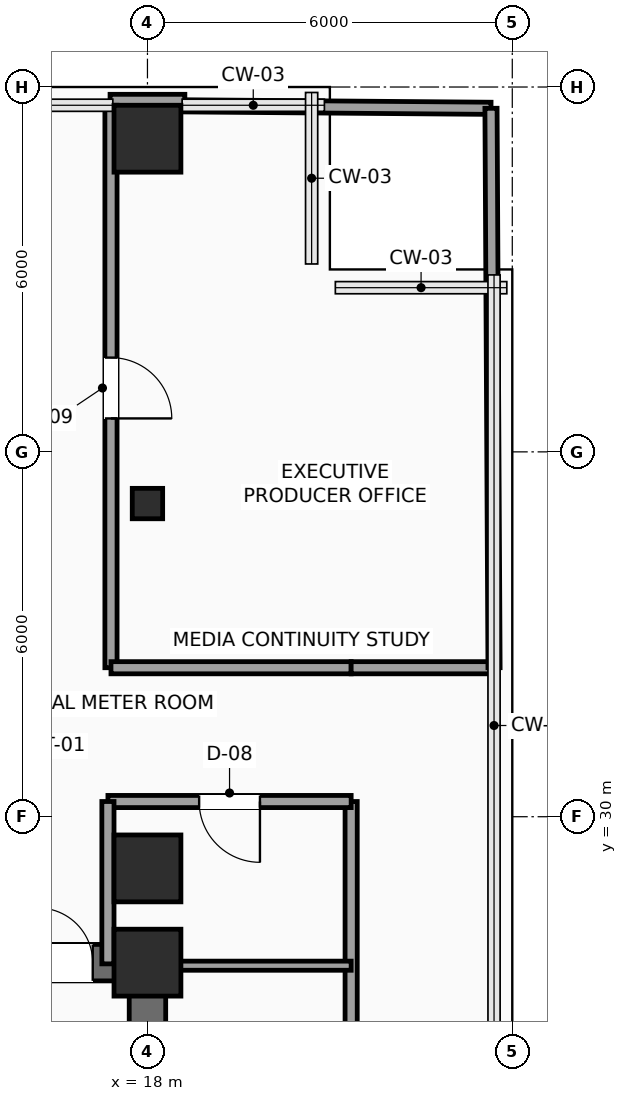
"""IFC4 building model, lengths in metres.
Left out: names, types, materials, properties, quantities, classifications, styles, units other than length and angle.
Written with IfcOpenShell. Run it as: python <this file> out.ifc"""

import sys

from ifc_helpers import new_model, si_unit, direction, frame, frame_2d, origin, origin_2d, place, context, subcontext, project, spatial, rectangle, hollow_rectangle, extrude, element, fill, save


model = new_model("IFC4")
c1 = context("Model", 3, precision=1e-05, world=origin(), true_north=direction((0.0, 1.0)))
c2 = subcontext(c1, "Body", "Model", "MODEL_VIEW")
j1 = project(units=[si_unit("LENGTHUNIT", "METRE"), si_unit("PLANEANGLEUNIT", "RADIAN")], contexts=[c1])
p1 = place(None, origin())
s1 = spatial("IfcSite", under=j1, at=p1, CompositionType="ELEMENT")
p2 = place(p1, origin())
s2 = spatial("IfcBuilding", under=s1, at=p2, CompositionType="ELEMENT")
p3 = place(p2, frame((0.0, 0.0, 123.15)))
s3 = spatial("IfcBuildingStorey", under=s2, at=p3, CompositionType="ELEMENT", Elevation=123.15)
for number, where, z_axis, x_axis in (
    (1, (18.0, 27.6, 0.0), (0.0, 0.0, 1.0), (1.0, 0.0, 0.0)),
    (2, (18.0, 29.15, 0.0), (0.0, 0.0, 1.0), (1.0, 0.0, 0.0)),
):
    element("IfcColumn", number, at=place(p3, frame(where, z_axis=z_axis, x_axis=x_axis)), inside=s3, PredefinedType="COLUMN", context=c2, shape_type="SweptSolid", body=[
        extrude(rectangle(XDim=1.1, YDim=1.1, at=origin_2d()), origin(), (0.0, 0.0, 1.0), 3.75),
    ])
p4 = place(p3, frame((18.0, 35.15, 0.0), z_axis=(0.0, 0.0, 1.0), x_axis=(1.0, 0.0, 0.0)))
e3 = element("IfcColumn", 3, at=p4, inside=s3, PredefinedType="COLUMN", context=c2, shape_type="SweptSolid", body=[
    extrude(hollow_rectangle(XDim=0.5, YDim=0.5, WallThickness=0.025, InnerFilletRadius=0.025, OuterFilletRadius=0.04, at=origin_2d()), origin(), (0.0, 0.0, 1.0), 3.75),
])
p5 = place(p3, frame((18.0, 41.15, 0.0), z_axis=(0.0, 0.0, 1.0), x_axis=(1.0, 0.0, 0.0)))
e4 = element("IfcColumn", 4, at=p5, inside=s3, PredefinedType="COLUMN", context=c2, shape_type="SweptSolid", body=[
    extrude(rectangle(XDim=1.1, YDim=1.1, at=origin_2d()), origin(), (0.0, 0.0, 1.0), 3.75),
])
p6 = place(p3, frame((17.385, 41.76, 0.0), z_axis=(0.0, 0.0, 1.0), x_axis=(1.0, 0.0, 0.0)))
e5 = element("IfcWall", 5, at=p6, inside=s3, PredefinedType="SOLIDWALL", context=c2, shape_type="SweptSolid", body=[
    extrude(rectangle(XDim=1.23, YDim=0.24, at=frame_2d((0.615, 0.0))), origin(), (0.0, 0.0, 1.0), 3.525),
])
p7 = place(p3, frame((6.0, 27.6, 0.0), z_axis=(0.0, 0.0, 1.0), x_axis=(1.0, 0.0, 0.0)))
e6 = element("IfcWall", 6, at=p7, inside=s3, PredefinedType="SHEAR", context=c2, shape_type="SweptSolid", body=[
    extrude(rectangle(XDim=12.0, YDim=0.6, at=frame_2d((6.0, 0.0))), origin(), (0.0, 0.0, 1.0), 3.525),
])
p8 = place(p7, frame((10.2, 0.0, 0.0)))
e7 = element("IfcOpeningElement", 7, at=p8, cuts=e6, PredefinedType="OPENING", context=c2, shape_type="SweptSolid", body=[
    extrude(rectangle(XDim=0.9, YDim=2.15, at=frame_2d((0.45, 1.075))), frame((0.0, 0.31, 0.0), z_axis=(0.0, -1.0, 0.0), x_axis=(1.0, 0.0, 0.0)), (0.0, 0.0, 1.0), 0.62),
])
p9 = place(p3, frame((18.0, 18.0, 0.0), z_axis=(0.0, 0.0, 1.0), x_axis=(0.0, 1.0, 0.0)))
e8 = element("IfcWall", 8, at=p9, inside=s3, PredefinedType="SHEAR", context=c2, shape_type="SweptSolid", body=[
    extrude(rectangle(XDim=9.6, YDim=0.6, at=frame_2d((4.8, 0.0))), origin(), (0.0, 0.0, 1.0), 3.525),
])
p10 = place(p3, frame((21.35, 11.25, 0.0), z_axis=(0.0, 0.0, 1.0), x_axis=(0.0, 1.0, 0.0)))
e9 = element("IfcWall", 9, at=p10, inside=s3, PredefinedType="SOLIDWALL", context=c2, shape_type="SweptSolid", body=[
    extrude(rectangle(XDim=19.0, YDim=0.2, at=frame_2d((9.5, 0.0))), origin(), (0.0, 0.0, 1.0), 3.525),
])
p11 = place(p10, frame((8.7, 0.0, 0.0)))
e10 = element("IfcOpeningElement", 10, at=p11, cuts=e9, PredefinedType="OPENING", context=c2, shape_type="SweptSolid", body=[
    extrude(rectangle(XDim=0.95, YDim=2.15, at=frame_2d((0.475, 1.075))), frame((0.0, 0.11, 0.0), z_axis=(0.0, -1.0, 0.0), x_axis=(1.0, 0.0, 0.0)), (0.0, 0.0, 1.0), 0.22),
])
p12 = place(p10, frame((13.475, 0.0, 0.0)))
e11 = element("IfcOpeningElement", 11, at=p12, cuts=e9, PredefinedType="OPENING", context=c2, shape_type="SweptSolid", body=[
    extrude(rectangle(XDim=0.9, YDim=2.1, at=frame_2d((0.45, 1.05))), frame((0.0, 0.11, 0.0), z_axis=(0.0, -1.0, 0.0), x_axis=(1.0, 0.0, 0.0)), (0.0, 0.0, 1.0), 0.22),
])
p13 = place(p10, frame((5.0, 0.0, 0.0)))
e12 = element("IfcOpeningElement", 12, at=p13, cuts=e9, PredefinedType="OPENING", context=c2, shape_type="SweptSolid", body=[
    extrude(rectangle(XDim=1.0, YDim=2.2, at=frame_2d((0.5, 1.1))), frame((0.0, 0.11, 0.0), z_axis=(0.0, -1.0, 0.0), x_axis=(1.0, 0.0, 0.0)), (0.0, 0.0, 1.0), 0.22),
])
p14 = place(p3, frame((21.35, 30.25, 0.0), z_axis=(0.0, 0.0, 1.0), x_axis=(-1.0, 0.0, 0.0)))
e13 = element("IfcWall", 13, at=p14, inside=s3, PredefinedType="SOLIDWALL", context=c2, shape_type="SweptSolid", body=[
    extrude(rectangle(XDim=4.0, YDim=0.2, at=frame_2d((2.0, 0.0))), origin(), (0.0, 0.0, 1.0), 3.525),
])
p15 = place(p14, frame((1.5, 0.0, 0.0)))
e14 = element("IfcOpeningElement", 14, at=p15, cuts=e13, PredefinedType="OPENING", context=c2, shape_type="SweptSolid", body=[
    extrude(rectangle(XDim=1.0, YDim=2.2, at=frame_2d((0.5, 1.1))), frame((0.0, 0.11, 0.0), z_axis=(0.0, -1.0, 0.0), x_axis=(1.0, 0.0, 0.0)), (0.0, 0.0, 1.0), 0.22),
])
p16 = place(p3, frame((17.35, 30.25, 0.0), z_axis=(0.0, 0.0, 1.0), x_axis=(0.0, -1.0, 0.0)))
e15 = element("IfcWall", 15, at=p16, inside=s3, PredefinedType="SOLIDWALL", context=c2, shape_type="SweptSolid", body=[
    extrude(rectangle(XDim=2.67, YDim=0.2, at=frame_2d((1.335, 0.0))), origin(), (0.0, 0.0, 1.0), 3.525),
])
p17 = place(p3, frame((17.4, 41.7, 0.0), z_axis=(0.0, 0.0, 1.0), x_axis=(0.0, -1.0, 0.0)))
e16 = element("IfcWall", 16, at=p17, inside=s3, PredefinedType="SOLIDWALL", context=c2, shape_type="SweptSolid", body=[
    extrude(rectangle(XDim=9.25, YDim=0.2, at=frame_2d((4.625, 0.0))), origin(), (0.0, 0.0, 1.0), 3.525),
])
p18 = place(p17, frame((4.15, 0.0, 0.0)))
e17 = element("IfcOpeningElement", 17, at=p18, cuts=e16, PredefinedType="OPENING", context=c2, shape_type="SweptSolid", body=[
    extrude(rectangle(XDim=1.0, YDim=2.2, at=frame_2d((0.5, 1.1))), frame((0.0, 0.11, 0.0), z_axis=(0.0, -1.0, 0.0), x_axis=(1.0, 0.0, 0.0)), (0.0, 0.0, 1.0), 0.22),
])
p19 = place(p3, frame((17.4, 32.45, 0.0), z_axis=(0.0, 0.0, 1.0), x_axis=(1.0, 0.0, 0.0)))
e18 = element("IfcWall", 18, at=p19, inside=s3, PredefinedType="SOLIDWALL", context=c2, shape_type="SweptSolid", body=[
    extrude(rectangle(XDim=3.95, YDim=0.2, at=frame_2d((1.975, 0.0))), origin(), (0.0, 0.0, 1.0), 3.525),
])
p20 = place(p3, frame((21.35, 32.45, 0.0), z_axis=(0.0, 0.0, 1.0), x_axis=(1.0, 0.0, 0.0)))
e19 = element("IfcWall", 19, at=p20, inside=s3, PredefinedType="SOLIDWALL", context=c2, shape_type="SweptSolid", body=[
    extrude(rectangle(XDim=2.35, YDim=0.2, at=frame_2d((1.175, 0.0))), origin(), (0.0, 0.0, 1.0), 3.525),
])
p21 = place(p3, frame((18.1, 27.55, 0.0), z_axis=(0.0, 0.0, 1.0), x_axis=(1.0, 0.0, 0.0)))
e20 = element("IfcWall", 20, at=p21, inside=s3, PredefinedType="PARTITIONING", context=c2, shape_type="SweptSolid", body=[
    extrude(rectangle(XDim=3.25, YDim=0.15, at=frame_2d((1.625, 0.0))), origin(), (0.0, 0.0, 1.0), 3.525),
])
p22 = place(p3, frame((18.615, 41.69, 0.0), z_axis=(0.0, 0.0, 1.0), x_axis=(0.99996799533, -0.008000519771, 0.0)))
e21 = element("IfcWall", 21, at=p22, inside=s3, PredefinedType="PARTITIONING", context=c2, shape_type="SweptSolid", body=[
    extrude(rectangle(XDim=5.035, YDim=0.2, at=frame_2d((2.518, 0.0))), origin(), (0.0, 0.0, 1.0), 3.525),
])
p23 = place(p3, frame((23.7, 32.45, 0.0), z_axis=(0.0, 0.0, 1.0), x_axis=(-0.005440038388, 0.999985202882, 0.0)))
e22 = element("IfcWall", 22, at=p23, inside=s3, PredefinedType="PARTITIONING", context=c2, shape_type="SweptSolid", body=[
    extrude(rectangle(XDim=9.2, YDim=0.2, at=frame_2d((4.6, 0.0))), origin(), (0.0, 0.0, 1.0), 3.525),
])
p24 = place(p8, origin())
e23 = element("IfcDoor", 23, at=p24, inside=s3, OperationType="SINGLE_SWING_LEFT", PredefinedType="DOOR", context=c2, shape_type="SweptSolid", body=[
    extrude(rectangle(XDim=0.9, YDim=2.15, at=frame_2d((0.45, 1.075))), frame((0.0, 0.025, 0.0), z_axis=(0.0, -1.0, 0.0), x_axis=(1.0, 0.0, 0.0)), (0.0, 0.0, 1.0), 0.05),
])
fill(e7, e23)
p25 = place(p15, origin())
e24 = element("IfcDoor", 24, at=p25, inside=s3, OperationType="SINGLE_SWING_LEFT", PredefinedType="DOOR", context=c2, shape_type="SweptSolid", body=[
    extrude(rectangle(XDim=1.0, YDim=2.2, at=frame_2d((0.5, 1.1))), frame((0.0, 0.025, 0.0), z_axis=(0.0, -1.0, 0.0), x_axis=(1.0, 0.0, 0.0)), (0.0, 0.0, 1.0), 0.05),
])
fill(e14, e24)
p26 = place(p18, origin())
e25 = element("IfcDoor", 25, at=p26, inside=s3, OperationType="SINGLE_SWING_RIGHT", PredefinedType="DOOR", context=c2, shape_type="SweptSolid", body=[
    extrude(rectangle(XDim=1.0, YDim=2.2, at=frame_2d((0.5, 1.1))), frame((0.0, 0.025, 0.0), z_axis=(0.0, -1.0, 0.0), x_axis=(1.0, 0.0, 0.0)), (0.0, 0.0, 1.0), 0.05),
])
fill(e17, e25)
save(model, sys.argv[1])
